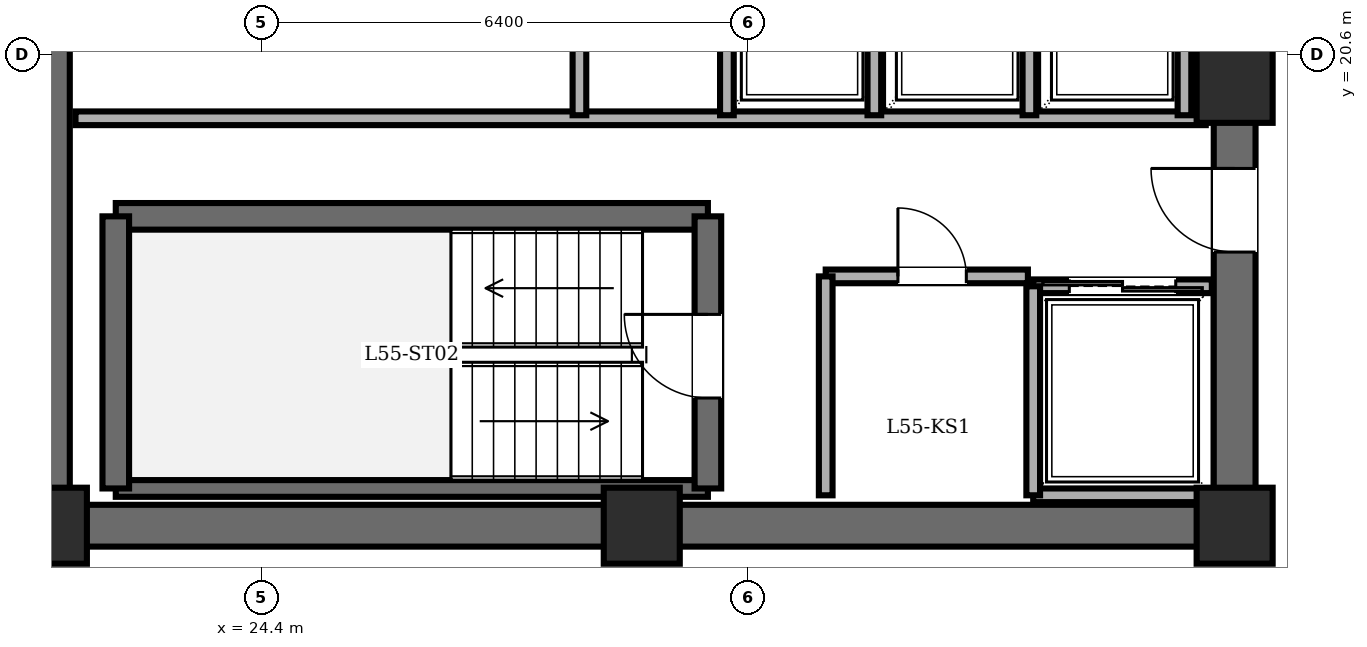
"""IFC4 building model, lengths in metres.
Left out: names, types, materials, properties, quantities, classifications, styles, units other than length and angle.
Written with IfcOpenShell. Run it as: python <this file> out.ifc"""

import sys

from ifc_helpers import new_model, si_unit, direction, frame, frame_2d, origin, origin_2d, place, context, subcontext, project, spatial, rectangle, extrude, element, fill, save


model = new_model("IFC4")
c1 = context("Model", 3, precision=1e-05, world=origin(), true_north=direction((0.0, 1.0)))
c2 = subcontext(c1, "Body", "Model", "MODEL_VIEW")
j1 = project(units=[si_unit("LENGTHUNIT", "METRE"), si_unit("PLANEANGLEUNIT", "RADIAN")], contexts=[c1])
p1 = place(None, origin())
s1 = spatial("IfcSite", under=j1, at=p1, CompositionType="ELEMENT")
p2 = place(p1, origin())
s2 = spatial("IfcBuilding", under=s1, at=p2, CompositionType="ELEMENT")
p3 = place(p2, frame((0.0, 0.0, 212.1)))
s3 = spatial("IfcBuildingStorey", under=s2, at=p3, CompositionType="ELEMENT", Elevation=212.1)
for number, where, z_axis, x_axis in (
    (1, (21.6, 14.4, 0.0), (0.0, 0.0, 1.0), (1.0, 0.0, 0.0)),
    (2, (29.4, 14.4, 0.0), (0.0, 0.0, 1.0), (1.0, 0.0, 0.0)),
    (3, (37.2, 14.4, 0.0), (0.0, 0.0, 1.0), (1.0, 0.0, 0.0)),
    (4, (37.2, 20.2, 0.0), (0.0, 0.0, 1.0), (1.0, 0.0, 0.0)),
):
    element("IfcColumn", number, at=place(p3, frame(where, z_axis=z_axis, x_axis=x_axis)), inside=s3, PredefinedType="COLUMN", context=c2, shape_type="SweptSolid", body=[
        extrude(rectangle(XDim=1.0, YDim=1.0, at=origin_2d()), origin(), (0.0, 0.0, 1.0), 3.6),
    ])
p4 = place(p3, frame((21.6, 14.4, 0.0), z_axis=(0.0, 0.0, 1.0), x_axis=(0.0, 1.0, 0.0)))
e5 = element("IfcWall", 5, at=p4, inside=s3, PredefinedType="SHEAR", context=c2, shape_type="SweptSolid", body=[
    extrude(rectangle(XDim=19.2, YDim=0.55, at=frame_2d((9.6, 0.0))), origin(), (0.0, 0.0, 1.0), 3.4),
])
p5 = place(p3, frame((37.2, 14.4, 0.0), z_axis=(0.0, 0.0, 1.0), x_axis=(-1.0, 0.0, 0.0)))
e6 = element("IfcWall", 6, at=p5, inside=s3, PredefinedType="SHEAR", context=c2, shape_type="SweptSolid", body=[
    extrude(rectangle(XDim=15.6, YDim=0.55, at=frame_2d((7.8, 0.0))), origin(), (0.0, 0.0, 1.0), 3.4),
])
p6 = place(p3, frame((37.2, 14.4, 0.0), z_axis=(0.0, 0.0, 1.0), x_axis=(0.0, 1.0, 0.0)))
e7 = element("IfcWall", 7, at=p6, inside=s3, PredefinedType="SHEAR", context=c2, shape_type="SweptSolid", body=[
    extrude(rectangle(XDim=19.2, YDim=0.55, at=frame_2d((9.6, 0.0))), origin(), (0.0, 0.0, 1.0), 3.4),
])
p7 = place(p6, frame((15.8, 0.0, 0.0)))
e8 = element("IfcOpeningElement", 8, at=p7, cuts=e7, PredefinedType="OPENING", context=c2, shape_type="SweptSolid", body=[
    extrude(rectangle(XDim=1.15, YDim=2.15, at=frame_2d((0.575, 1.075))), frame((0.0, 0.285, 0.0), z_axis=(0.0, -1.0, 0.0), x_axis=(1.0, 0.0, 0.0)), (0.0, 0.0, 1.0), 0.57),
])
p8 = place(p6, frame((3.6, 0.0, 0.0)))
e9 = element("IfcOpeningElement", 9, at=p8, cuts=e7, PredefinedType="OPENING", context=c2, shape_type="SweptSolid", body=[
    extrude(rectangle(XDim=1.1, YDim=2.15, at=frame_2d((0.55, 1.075))), frame((0.0, 0.285, 0.0), z_axis=(0.0, -1.0, 0.0), x_axis=(1.0, 0.0, 0.0)), (0.0, 0.0, 1.0), 0.57),
])
p9 = place(p6, frame((8.6, 0.0, 0.0)))
e10 = element("IfcOpeningElement", 10, at=p9, cuts=e7, PredefinedType="OPENING", context=c2, shape_type="SweptSolid", body=[
    extrude(rectangle(XDim=1.3, YDim=2.2, at=frame_2d((0.65, 1.1))), frame((0.0, 0.285, 0.0), z_axis=(0.0, -1.0, 0.0), x_axis=(1.0, 0.0, 0.0)), (0.0, 0.0, 1.0), 0.57),
])
p10 = place(p3, frame((22.48, 18.47, 0.0), z_axis=(0.0, 0.0, 1.0), x_axis=(1.0, 0.0, 0.0)))
e11 = element("IfcWall", 11, at=p10, inside=s3, PredefinedType="SOLIDWALL", context=c2, shape_type="SweptSolid", body=[
    extrude(rectangle(XDim=7.79, YDim=0.35, at=frame_2d((3.895, 0.0))), origin(), (0.0, 0.0, 1.0), 3.4),
])
p11 = place(p3, frame((22.48, 14.89, 0.0), z_axis=(0.0, 0.0, 1.0), x_axis=(1.0, 0.0, 0.0)))
e12 = element("IfcWall", 12, at=p11, inside=s3, PredefinedType="PARTITIONING", context=c2, shape_type="SweptSolid", body=[
    extrude(rectangle(XDim=7.79, YDim=0.22, at=frame_2d((3.895, 0.0))), origin(), (0.0, 0.0, 1.0), 3.4),
])
p12 = place(p3, frame((22.48, 14.89, 0.0), z_axis=(0.0, 0.0, 1.0), x_axis=(0.0, 1.0, 0.0)))
e13 = element("IfcWall", 13, at=p12, inside=s3, PredefinedType="SOLIDWALL", context=c2, shape_type="SweptSolid", body=[
    extrude(rectangle(XDim=3.58, YDim=0.35, at=frame_2d((1.79, 0.0))), origin(), (0.0, 0.0, 1.0), 3.4),
])
p13 = place(p3, frame((30.27, 14.89, 0.0), z_axis=(0.0, 0.0, 1.0), x_axis=(0.0, 1.0, 0.0)))
e14 = element("IfcWall", 14, at=p13, inside=s3, PredefinedType="SOLIDWALL", context=c2, shape_type="SweptSolid", body=[
    extrude(rectangle(XDim=3.58, YDim=0.35, at=frame_2d((1.79, 0.0))), origin(), (0.0, 0.0, 1.0), 3.4),
])
p14 = place(p13, frame((1.19, 0.0, 0.0)))
e15 = element("IfcOpeningElement", 15, at=p14, cuts=e14, PredefinedType="OPENING", context=c2, shape_type="SweptSolid", body=[
    extrude(rectangle(XDim=1.1, YDim=2.15, at=frame_2d((0.55, 1.075))), frame((0.0, 0.185, 0.0), z_axis=(0.0, -1.0, 0.0), x_axis=(1.0, 0.0, 0.0)), (0.0, 0.0, 1.0), 0.37),
])
p15 = place(p3, frame((21.95, 19.76, 0.0), z_axis=(0.0, 0.0, 1.0), x_axis=(1.0, 0.0, 0.0)))
e16 = element("IfcWall", 16, at=p15, inside=s3, PredefinedType="PARTITIONING", context=c2, shape_type="SweptSolid", body=[
    extrude(rectangle(XDim=14.87, YDim=0.18, at=frame_2d((7.435, 0.0))), origin(), (0.0, 0.0, 1.0), 3.4),
])
p16 = place(p3, frame((31.82, 17.68, 0.0), z_axis=(0.0, 0.0, 1.0), x_axis=(1.0, 0.0, 0.0)))
e17 = element("IfcWall", 17, at=p16, inside=s3, PredefinedType="PARTITIONING", context=c2, shape_type="SweptSolid", body=[
    extrude(rectangle(XDim=2.66, YDim=0.18, at=frame_2d((1.33, 0.0))), origin(), (0.0, 0.0, 1.0), 3.4),
])
p17 = place(p16, frame((0.95, 0.0, 0.0)))
e18 = element("IfcOpeningElement", 18, at=p17, cuts=e17, PredefinedType="OPENING", context=c2, shape_type="SweptSolid", body=[
    extrude(rectangle(XDim=0.9, YDim=2.05, at=frame_2d((0.45, 1.025))), frame((0.0, 0.1, 0.0), z_axis=(0.0, -1.0, 0.0), x_axis=(1.0, 0.0, 0.0)), (0.0, 0.0, 1.0), 0.2),
])
p18 = place(p3, frame((31.82, 14.8, 0.0), z_axis=(0.0, 0.0, 1.0), x_axis=(0.0, 1.0, 0.0)))
e19 = element("IfcWall", 19, at=p18, inside=s3, PredefinedType="PARTITIONING", context=c2, shape_type="SweptSolid", body=[
    extrude(rectangle(XDim=2.88, YDim=0.18, at=frame_2d((1.44, 0.0))), origin(), (0.0, 0.0, 1.0), 3.4),
])
p19 = place(p3, frame((34.55, 17.55, 0.0), z_axis=(0.0, 0.0, 1.0), x_axis=(1.0, 0.0, 0.0)))
e20 = element("IfcWall", 20, at=p19, inside=s3, PredefinedType="PARTITIONING", context=c2, shape_type="SweptSolid", body=[
    extrude(rectangle(XDim=2.35, YDim=0.18, at=frame_2d((1.175, 0.0))), origin(), (0.0, 0.0, 1.0), 3.4),
])
p20 = place(p19, frame((0.475, 0.0, 0.0)))
e21 = element("IfcOpeningElement", 21, at=p20, cuts=e20, PredefinedType="OPENING", context=c2, shape_type="SweptSolid", body=[
    extrude(rectangle(XDim=1.4, YDim=2.3, at=frame_2d((0.7, 1.15))), frame((0.0, 0.1, 0.0), z_axis=(0.0, -1.0, 0.0), x_axis=(1.0, 0.0, 0.0)), (0.0, 0.0, 1.0), 0.2),
])
p21 = place(p3, frame((36.9, 14.8, 0.0), z_axis=(0.0, 0.0, 1.0), x_axis=(-1.0, 0.0, 0.0)))
e22 = element("IfcWall", 22, at=p21, inside=s3, PredefinedType="PARTITIONING", context=c2, shape_type="SweptSolid", body=[
    extrude(rectangle(XDim=2.35, YDim=0.18, at=frame_2d((1.175, 0.0))), origin(), (0.0, 0.0, 1.0), 3.4),
])
p22 = place(p3, frame((34.55, 17.55, 0.0), z_axis=(0.0, 0.0, 1.0), x_axis=(0.0, -1.0, 0.0)))
e23 = element("IfcWall", 23, at=p22, inside=s3, PredefinedType="PARTITIONING", context=c2, shape_type="SweptSolid", body=[
    extrude(rectangle(XDim=2.75, YDim=0.18, at=frame_2d((1.375, 0.0))), origin(), (0.0, 0.0, 1.0), 3.4),
])
for number, where, z_axis, x_axis in (
    (24, (32.46, 19.8, 0.0), (0.0, 0.0, 1.0), (0.0, 1.0, 0.0)),
    (25, (34.5, 19.8, 0.0), (0.0, 0.0, 1.0), (0.0, 1.0, 0.0)),
    (26, (36.54, 19.8, 0.0), (0.0, 0.0, 1.0), (0.0, 1.0, 0.0)),
):
    element("IfcWall", number, at=place(p3, frame(where, z_axis=z_axis, x_axis=x_axis)), inside=s3, PredefinedType="PARTITIONING", context=c2, shape_type="SweptSolid", body=[
        extrude(rectangle(XDim=2.5, YDim=0.18, at=frame_2d((1.25, 0.0))), origin(), (0.0, 0.0, 1.0), 3.4),
    ])
p23 = place(p3, frame((30.52, 19.8, 0.0), z_axis=(0.0, 0.0, 1.0), x_axis=(0.0, 1.0, 0.0)))
e27 = element("IfcWall", 27, at=p23, inside=s3, PredefinedType="PARTITIONING", context=c2, shape_type="SweptSolid", body=[
    extrude(rectangle(XDim=2.55, YDim=0.18, at=frame_2d((1.275, 0.0))), origin(), (0.0, 0.0, 1.0), 3.4),
])
p24 = place(p3, frame((28.58, 19.8, 0.0), z_axis=(0.0, 0.0, 1.0), x_axis=(0.0, 1.0, 0.0)))
e28 = element("IfcWall", 28, at=p24, inside=s3, PredefinedType="PARTITIONING", context=c2, shape_type="SweptSolid", body=[
    extrude(rectangle(XDim=3.85, YDim=0.18, at=frame_2d((1.925, 0.0))), origin(), (0.0, 0.0, 1.0), 3.4),
])
p25 = place(p24, frame((1.465, 0.0, 0.0)))
e29 = element("IfcOpeningElement", 29, at=p25, cuts=e28, PredefinedType="OPENING", context=c2, shape_type="SweptSolid", body=[
    extrude(rectangle(XDim=0.92, YDim=2.1, at=frame_2d((0.46, 1.05))), frame((0.0, 0.1, 0.0), z_axis=(0.0, -1.0, 0.0), x_axis=(1.0, 0.0, 0.0)), (0.0, 0.0, 1.0), 0.2),
])
p26 = place(p14, origin())
e30 = element("IfcDoor", 30, at=p26, inside=s3, OperationType="SINGLE_SWING_RIGHT", PredefinedType="DOOR", context=c2, shape_type="SweptSolid", body=[
    extrude(rectangle(XDim=1.1, YDim=2.15, at=frame_2d((0.55, 1.075))), frame((0.0, 0.025, 0.0), z_axis=(0.0, -1.0, 0.0), x_axis=(1.0, 0.0, 0.0)), (0.0, 0.0, 1.0), 0.05),
])
fill(e15, e30)
p27 = place(p8, origin())
e31 = element("IfcDoor", 31, at=p27, inside=s3, OperationType="SINGLE_SWING_RIGHT", PredefinedType="DOOR", context=c2, shape_type="SweptSolid", body=[
    extrude(rectangle(XDim=1.1, YDim=2.15, at=frame_2d((0.55, 1.075))), frame((0.0, 0.025, 0.0), z_axis=(0.0, -1.0, 0.0), x_axis=(1.0, 0.0, 0.0)), (0.0, 0.0, 1.0), 0.05),
])
fill(e9, e31)
p28 = place(p17, origin())
e32 = element("IfcDoor", 32, at=p28, inside=s3, OperationType="SINGLE_SWING_LEFT", PredefinedType="DOOR", context=c2, shape_type="SweptSolid", body=[
    extrude(rectangle(XDim=0.9, YDim=2.05, at=frame_2d((0.45, 1.025))), frame((0.0, 0.025, 0.0), z_axis=(0.0, -1.0, 0.0), x_axis=(1.0, 0.0, 0.0)), (0.0, 0.0, 1.0), 0.05),
])
fill(e18, e32)
p29 = place(p20, origin())
e33 = element("IfcDoor", 33, at=p29, inside=s3, OperationType="DOUBLE_DOOR_SLIDING", PredefinedType="DOOR", context=c2, shape_type="SweptSolid", body=[
    extrude(rectangle(XDim=1.4, YDim=2.3, at=frame_2d((0.7, 1.15))), frame((0.0, 0.025, 0.0), z_axis=(0.0, -1.0, 0.0), x_axis=(1.0, 0.0, 0.0)), (0.0, 0.0, 1.0), 0.05),
])
fill(e21, e33)
save(model, sys.argv[1])
